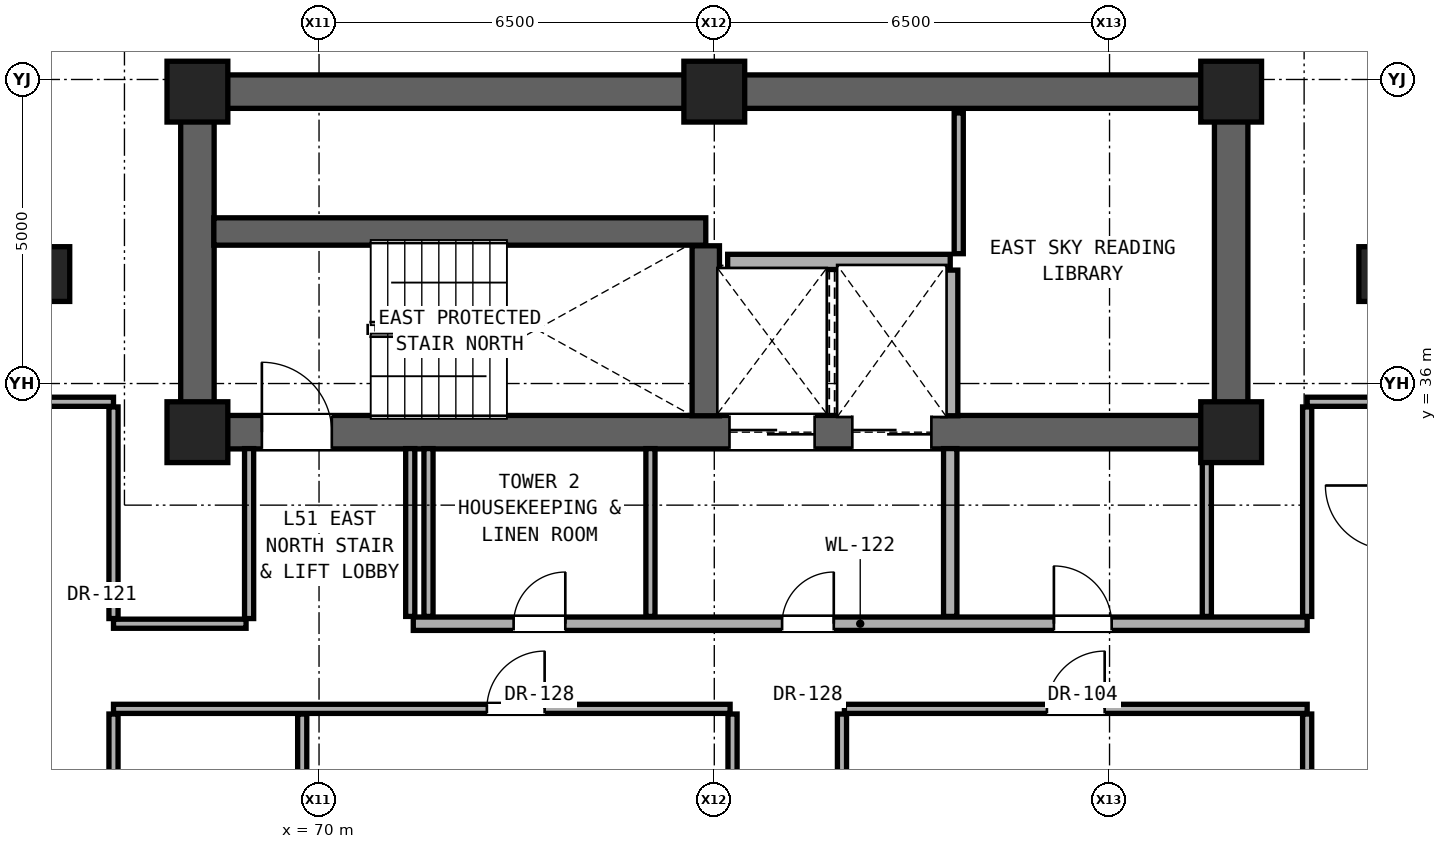
"""IFC4 building model, lengths in metres.
Left out: names, types, materials, properties, quantities, classifications, styles, units other than length and angle.
Written with IfcOpenShell. Run it as: python <this file> out.ifc"""

import sys

from ifc_helpers import new_model, si_unit, direction, frame, frame_2d, origin, origin_2d, place, context, subcontext, project, spatial, rectangle, extrude, element, fill, save


model = new_model("IFC4")
c1 = context("Model", 3, precision=1e-05, world=origin(), true_north=direction((0.0, 1.0)))
c2 = subcontext(c1, "Body", "Model", "MODEL_VIEW")
j1 = project(units=[si_unit("LENGTHUNIT", "METRE"), si_unit("PLANEANGLEUNIT", "RADIAN")], contexts=[c1])
p1 = place(None, origin())
s1 = spatial("IfcSite", under=j1, at=p1, CompositionType="ELEMENT")
p2 = place(p1, origin())
s2 = spatial("IfcBuilding", under=s1, at=p2, CompositionType="ELEMENT")
p3 = place(p2, frame((0.0, 0.0, 180.4)))
s3 = spatial("IfcBuildingStorey", under=s2, at=p3, CompositionType="ELEMENT", Elevation=180.4)
for number, where, z_axis, x_axis in (
    (1, (68.0, 35.2, 0.0), (0.0, 0.0, 1.0), (1.0, 0.0, 0.0)),
    (2, (85.0, 35.2, 0.0), (0.0, 0.0, 1.0), (1.0, 0.0, 0.0)),
    (3, (68.0, 40.8, 0.0), (0.0, 0.0, 1.0), (1.0, 0.0, 0.0)),
    (4, (76.5, 40.8, 0.0), (0.0, 0.0, 1.0), (1.0, 0.0, 0.0)),
    (5, (85.0, 40.8, 0.0), (0.0, 0.0, 1.0), (1.0, 0.0, 0.0)),
):
    element("IfcColumn", number, at=place(p3, frame(where, z_axis=z_axis, x_axis=x_axis)), inside=s3, PredefinedType="COLUMN", context=c2, shape_type="SweptSolid", body=[
        extrude(rectangle(XDim=1.0, YDim=1.0, at=origin_2d()), origin(), (0.0, 0.0, 1.0), 3.25),
    ])
for number, where, z_axis, x_axis in (
    (6, (65.6, 37.8, 0.0), (0.0, 0.0, 1.0), (1.0, 0.0, 0.0)),
    (7, (87.4, 37.8, 0.0), (0.0, 0.0, 1.0), (1.0, 0.0, 0.0)),
):
    element("IfcColumn", number, at=place(p3, frame(where, z_axis=z_axis, x_axis=x_axis)), inside=s3, PredefinedType="PILASTER", context=c2, shape_type="SweptSolid", body=[
        extrude(rectangle(XDim=0.6, YDim=0.9, at=origin_2d()), origin(), (0.0, 0.0, 1.0), 3.25),
    ])
p4 = place(p3, frame((68.0, 40.8, 0.0), z_axis=(0.0, 0.0, 1.0), x_axis=(1.0, 0.0, 0.0)))
e8 = element("IfcWall", 8, at=p4, inside=s3, PredefinedType="SHEAR", context=c2, shape_type="SweptSolid", body=[
    extrude(rectangle(XDim=17.0, YDim=0.55, at=frame_2d((8.5, 0.0))), origin(), (0.0, 0.0, 1.0), 3.05),
])
for number, where, z_axis, x_axis in (
    (9, (68.0, 35.2, 0.0), (0.0, 0.0, 1.0), (0.0, 1.0, 0.0)),
    (10, (85.0, 35.2, 0.0), (0.0, 0.0, 1.0), (0.0, 1.0, 0.0)),
):
    element("IfcWall", number, at=place(p3, frame(where, z_axis=z_axis, x_axis=x_axis)), inside=s3, PredefinedType="SHEAR", context=c2, shape_type="SweptSolid", body=[
        extrude(rectangle(XDim=5.6, YDim=0.55, at=frame_2d((2.8, 0.0))), origin(), (0.0, 0.0, 1.0), 3.05),
    ])
p5 = place(p3, frame((68.0, 35.2, 0.0), z_axis=(0.0, 0.0, 1.0), x_axis=(1.0, 0.0, 0.0)))
e11 = element("IfcWall", 11, at=p5, inside=s3, PredefinedType="SHEAR", context=c2, shape_type="SweptSolid", body=[
    extrude(rectangle(XDim=17.0, YDim=0.55, at=frame_2d((8.5, 0.0))), origin(), (0.0, 0.0, 1.0), 3.05),
])
p6 = place(p5, frame((1.06, 0.0, 0.0)))
e12 = element("IfcOpeningElement", 12, at=p6, cuts=e11, PredefinedType="OPENING", context=c2, shape_type="SweptSolid", body=[
    extrude(rectangle(XDim=1.15, YDim=2.2, at=frame_2d((0.575, 1.1))), frame((0.0, 0.285, 0.0), z_axis=(0.0, -1.0, 0.0), x_axis=(1.0, 0.0, 0.0)), (0.0, 0.0, 1.0), 0.57),
])
p7 = place(p5, frame((8.75, 0.0, 0.0)))
e13 = element("IfcOpeningElement", 13, at=p7, cuts=e11, PredefinedType="OPENING", context=c2, shape_type="SweptSolid", body=[
    extrude(rectangle(XDim=1.4, YDim=2.35, at=frame_2d((0.7, 1.175))), frame((0.0, 0.285, 0.0), z_axis=(0.0, -1.0, 0.0), x_axis=(1.0, 0.0, 0.0)), (0.0, 0.0, 1.0), 0.57),
])
p8 = place(p5, frame((10.77, 0.0, 0.0)))
e14 = element("IfcOpeningElement", 14, at=p8, cuts=e11, PredefinedType="OPENING", context=c2, shape_type="SweptSolid", body=[
    extrude(rectangle(XDim=1.3, YDim=2.3, at=frame_2d((0.65, 1.15))), frame((0.0, 0.285, 0.0), z_axis=(0.0, -1.0, 0.0), x_axis=(1.0, 0.0, 0.0)), (0.0, 0.0, 1.0), 0.57),
])
p9 = place(p3, frame((66.62, 30.65, 0.0), z_axis=(0.0, 0.0, 1.0), x_axis=(1.0, 0.0, 0.0)))
e15 = element("IfcWall", 15, at=p9, inside=s3, PredefinedType="PARTITIONING", context=c2, shape_type="SweptSolid", body=[
    extrude(rectangle(XDim=10.14, YDim=0.15, at=frame_2d((5.07, 0.0))), origin(), (0.0, 0.0, 1.0), 2.186),
])
p10 = place(p9, frame((6.14, 0.0, 0.0)))
e16 = element("IfcOpeningElement", 16, at=p10, cuts=e15, PredefinedType="OPENING", context=c2, shape_type="SweptSolid", body=[
    extrude(rectangle(XDim=0.95, YDim=2.15, at=frame_2d((0.475, 1.075))), frame((0.0, 0.085, 0.0), z_axis=(0.0, -1.0, 0.0), x_axis=(1.0, 0.0, 0.0)), (0.0, 0.0, 1.0), 0.17),
])
p11 = place(p3, frame((78.64, 30.65, 0.0), z_axis=(0.0, 0.0, 1.0), x_axis=(1.0, 0.0, 0.0)))
e17 = element("IfcWall", 17, at=p11, inside=s3, PredefinedType="PARTITIONING", context=c2, shape_type="SweptSolid", body=[
    extrude(rectangle(XDim=7.61, YDim=0.15, at=frame_2d((3.805, 0.0))), origin(), (0.0, 0.0, 1.0), 2.186),
])
p12 = place(p11, frame((3.33, 0.0, 0.0)))
e18 = element("IfcOpeningElement", 18, at=p12, cuts=e17, PredefinedType="OPENING", context=c2, shape_type="SweptSolid", body=[
    extrude(rectangle(XDim=0.95, YDim=2.15, at=frame_2d((0.475, 1.075))), frame((0.0, 0.085, 0.0), z_axis=(0.0, -1.0, 0.0), x_axis=(1.0, 0.0, 0.0)), (0.0, 0.0, 1.0), 0.17),
])
p13 = place(p3, frame((66.62, 32.05, 0.0), z_axis=(0.0, 0.0, 1.0), x_axis=(1.0, 0.0, 0.0)))
e19 = element("IfcWall", 19, at=p13, inside=s3, PredefinedType="PARTITIONING", context=c2, shape_type="SweptSolid", body=[
    extrude(rectangle(XDim=2.18, YDim=0.15, at=frame_2d((1.09, 0.0))), origin(), (0.0, 0.0, 1.0), 2.186),
])
p14 = place(p3, frame((71.55, 32.05, 0.0), z_axis=(0.0, 0.0, 1.0), x_axis=(1.0, 0.0, 0.0)))
e20 = element("IfcWall", 20, at=p14, inside=s3, PredefinedType="SOLIDWALL", context=c2, shape_type="SweptSolid", body=[
    extrude(rectangle(XDim=14.7, YDim=0.22, at=frame_2d((7.35, 0.0))), origin(), (0.0, 0.0, 1.0), 2.186),
])
p15 = place(p14, frame((6.065, 0.0, 0.0)))
e21 = element("IfcOpeningElement", 21, at=p15, cuts=e20, PredefinedType="OPENING", context=c2, shape_type="SweptSolid", body=[
    extrude(rectangle(XDim=0.85, YDim=2.01, at=frame_2d((0.425, 1.005))), frame((0.0, 0.12, 0.0), z_axis=(0.0, -1.0, 0.0), x_axis=(1.0, 0.0, 0.0)), (0.0, 0.0, 1.0), 0.24),
])
p16 = place(p14, frame((10.535, 0.0, 0.0)))
e22 = element("IfcOpeningElement", 22, at=p16, cuts=e20, PredefinedType="OPENING", context=c2, shape_type="SweptSolid", body=[
    extrude(rectangle(XDim=0.95, YDim=2.15, at=frame_2d((0.475, 1.075))), frame((0.0, 0.12, 0.0), z_axis=(0.0, -1.0, 0.0), x_axis=(1.0, 0.0, 0.0)), (0.0, 0.0, 1.0), 0.24),
])
p17 = place(p14, frame((1.65, 0.0, 0.0)))
e23 = element("IfcOpeningElement", 23, at=p17, cuts=e20, PredefinedType="OPENING", context=c2, shape_type="SweptSolid", body=[
    extrude(rectangle(XDim=0.85, YDim=2.01, at=frame_2d((0.425, 1.005))), frame((0.0, 0.12, 0.0), z_axis=(0.0, -1.0, 0.0), x_axis=(1.0, 0.0, 0.0)), (0.0, 0.0, 1.0), 0.24),
])
p18 = place(p3, frame((65.25, 35.7, 0.0), z_axis=(0.0, 0.0, 1.0), x_axis=(1.0, 0.0, 0.0)))
e24 = element("IfcWall", 24, at=p18, inside=s3, PredefinedType="PARTITIONING", context=c2, shape_type="SweptSolid", body=[
    extrude(rectangle(XDim=1.37, YDim=0.15, at=frame_2d((0.685, 0.0))), origin(), (0.0, 0.0, 1.0), 3.05),
])
p19 = place(p3, frame((86.25, 35.7, 0.0), z_axis=(0.0, 0.0, 1.0), x_axis=(1.0, 0.0, 0.0)))
e25 = element("IfcWall", 25, at=p19, inside=s3, PredefinedType="PARTITIONING", context=c2, shape_type="SweptSolid", body=[
    extrude(rectangle(XDim=1.35, YDim=0.15, at=frame_2d((0.675, 0.0))), origin(), (0.0, 0.0, 1.0), 3.05),
])
p20 = place(p3, frame((76.72, 38.0, 0.0), z_axis=(0.0, 0.0, 1.0), x_axis=(1.0, 0.0, 0.0)))
e26 = element("IfcWall", 26, at=p20, inside=s3, PredefinedType="SOLIDWALL", context=c2, shape_type="SweptSolid", body=[
    extrude(rectangle(XDim=3.66, YDim=0.25, at=frame_2d((1.83, 0.0))), origin(), (0.0, 0.0, 1.0), 3.05),
])
p21 = place(p3, frame((68.27, 38.5, 0.0), z_axis=(0.0, 0.0, 1.0), x_axis=(1.0, 0.0, 0.0)))
e27 = element("IfcWall", 27, at=p21, inside=s3, PredefinedType="SHEAR", context=c2, shape_type="SweptSolid", body=[
    extrude(rectangle(XDim=8.09, YDim=0.45, at=frame_2d((4.045, 0.0))), origin(), (0.0, 0.0, 1.0), 3.05),
])
p22 = place(p3, frame((66.62, 24.935, 0.0), z_axis=(0.0, 0.0, 1.0), x_axis=(0.0, 1.0, 0.0)))
e28 = element("IfcWall", 28, at=p22, inside=s3, PredefinedType="PARTITIONING", context=c2, shape_type="SweptSolid", body=[
    extrude(rectangle(XDim=5.63, YDim=0.15, at=frame_2d((2.815, 0.0))), origin(), (0.0, 0.0, 1.0), 2.346),
])
p23 = place(p22, frame((2.34, 0.0, 0.0)))
e29 = element("IfcOpeningElement", 29, at=p23, cuts=e28, PredefinedType="OPENING", context=c2, shape_type="SweptSolid", body=[
    extrude(rectangle(XDim=0.95, YDim=2.15, at=frame_2d((0.475, 1.075))), frame((0.0, 0.085, 0.0), z_axis=(0.0, -1.0, 0.0), x_axis=(1.0, 0.0, 0.0)), (0.0, 0.0, 1.0), 0.17),
])
p24 = place(p3, frame((66.62, 32.135, 0.0), z_axis=(0.0, 0.0, 1.0), x_axis=(0.0, 1.0, 0.0)))
e30 = element("IfcWall", 30, at=p24, inside=s3, PredefinedType="PARTITIONING", context=c2, shape_type="SweptSolid", body=[
    extrude(rectangle(XDim=3.48, YDim=0.15, at=frame_2d((1.74, 0.0))), origin(), (0.0, 0.0, 1.0), 2.442),
])
p25 = place(p3, frame((68.85, 32.135, 0.0), z_axis=(0.0, 0.0, 1.0), x_axis=(0.0, 1.0, 0.0)))
e31 = element("IfcWall", 31, at=p25, inside=s3, PredefinedType="PARTITIONING", context=c2, shape_type="SweptSolid", body=[
    extrude(rectangle(XDim=2.795, YDim=0.15, at=frame_2d((1.397, 0.0))), origin(), (0.0, 0.0, 1.0), 3.05),
])
p26 = place(p3, frame((69.723, 24.935, 0.0), z_axis=(0.0, 0.0, 1.0), x_axis=(0.0, 1.0, 0.0)))
e32 = element("IfcWall", 32, at=p26, inside=s3, PredefinedType="PARTITIONING", context=c2, shape_type="SweptSolid", body=[
    extrude(rectangle(XDim=5.63, YDim=0.15, at=frame_2d((2.815, 0.0))), origin(), (0.0, 0.0, 1.0), 2.186),
])
for number, where, z_axis, x_axis in (
    (33, (71.5, 32.17, 0.0), (0.0, 0.0, 1.0), (0.0, 1.0, 0.0)),
    (34, (71.8, 32.17, 0.0), (0.0, 0.0, 1.0), (0.0, 1.0, 0.0)),
    (35, (75.45, 32.17, 0.0), (0.0, 0.0, 1.0), (0.0, 1.0, 0.0)),
):
    element("IfcWall", number, at=place(p3, frame(where, z_axis=z_axis, x_axis=x_axis)), inside=s3, PredefinedType="PARTITIONING", context=c2, shape_type="SweptSolid", body=[
        extrude(rectangle(XDim=2.76, YDim=0.15, at=frame_2d((1.38, 0.0))), origin(), (0.0, 0.0, 1.0), 3.05),
    ])
p27 = place(p3, frame((76.36, 35.47, 0.0), z_axis=(0.0, 0.0, 1.0), x_axis=(0.0, 1.0, 0.0)))
e36 = element("IfcWall", 36, at=p27, inside=s3, PredefinedType="SHEAR", context=c2, shape_type="SweptSolid", body=[
    extrude(rectangle(XDim=2.795, YDim=0.45, at=frame_2d((1.397, 0.0))), origin(), (0.0, 0.0, 1.0), 3.05),
])
p28 = place(p3, frame((76.8, 22.435, 0.0), z_axis=(0.0, 0.0, 1.0), x_axis=(0.0, 1.0, 0.0)))
e37 = element("IfcWall", 37, at=p28, inside=s3, PredefinedType="PARTITIONING", context=c2, shape_type="SweptSolid", body=[
    extrude(rectangle(XDim=8.13, YDim=0.15, at=frame_2d((4.065, 0.0))), origin(), (0.0, 0.0, 1.0), 2.186),
])
p29 = place(p3, frame((78.6, 27.485, 0.0), z_axis=(0.0, 0.0, 1.0), x_axis=(0.0, 1.0, 0.0)))
e38 = element("IfcWall", 38, at=p29, inside=s3, PredefinedType="PARTITIONING", context=c2, shape_type="SweptSolid", body=[
    extrude(rectangle(XDim=3.08, YDim=0.15, at=frame_2d((1.54, 0.0))), origin(), (0.0, 0.0, 1.0), 2.186),
])
p30 = place(p3, frame((80.38, 32.17, 0.0), z_axis=(0.0, 0.0, 1.0), x_axis=(0.0, 1.0, 0.0)))
e39 = element("IfcWall", 39, at=p30, inside=s3, PredefinedType="SOLIDWALL", context=c2, shape_type="SweptSolid", body=[
    extrude(rectangle(XDim=2.76, YDim=0.22, at=frame_2d((1.38, 0.0))), origin(), (0.0, 0.0, 1.0), 3.05),
])
p31 = place(p3, frame((80.38, 35.47, 0.0), z_axis=(0.0, 0.0, 1.0), x_axis=(0.0, 1.0, 0.0)))
e40 = element("IfcWall", 40, at=p31, inside=s3, PredefinedType="SOLIDWALL", context=c2, shape_type="SweptSolid", body=[
    extrude(rectangle(XDim=2.395, YDim=0.25, at=frame_2d((1.198, 0.0))), origin(), (0.0, 0.0, 1.0), 3.05),
])
p32 = place(p3, frame((80.52, 38.135, 0.0), z_axis=(0.0, 0.0, 1.0), x_axis=(0.0, 1.0, 0.0)))
e41 = element("IfcWall", 41, at=p32, inside=s3, PredefinedType="PARTITIONING", context=c2, shape_type="SweptSolid", body=[
    extrude(rectangle(XDim=2.315, YDim=0.15, at=frame_2d((1.157, 0.0))), origin(), (0.0, 0.0, 1.0), 3.05),
])
p33 = place(p3, frame((84.6, 32.17, 0.0), z_axis=(0.0, 0.0, 1.0), x_axis=(0.0, 1.0, 0.0)))
e42 = element("IfcWall", 42, at=p33, inside=s3, PredefinedType="PARTITIONING", context=c2, shape_type="SweptSolid", body=[
    extrude(rectangle(XDim=2.76, YDim=0.15, at=frame_2d((1.38, 0.0))), origin(), (0.0, 0.0, 1.0), 3.05),
])
p34 = place(p3, frame((86.25, 27.485, 0.0), z_axis=(0.0, 0.0, 1.0), x_axis=(0.0, 1.0, 0.0)))
e43 = element("IfcWall", 43, at=p34, inside=s3, PredefinedType="PARTITIONING", context=c2, shape_type="SweptSolid", body=[
    extrude(rectangle(XDim=3.08, YDim=0.15, at=frame_2d((1.54, 0.0))), origin(), (0.0, 0.0, 1.0), 2.346),
])
p35 = place(p3, frame((86.25, 32.17, 0.0), z_axis=(0.0, 0.0, 1.0), x_axis=(0.0, 1.0, 0.0)))
e44 = element("IfcWall", 44, at=p35, inside=s3, PredefinedType="PARTITIONING", context=c2, shape_type="SweptSolid", body=[
    extrude(rectangle(XDim=3.445, YDim=0.15, at=frame_2d((1.723, 0.0))), origin(), (0.0, 0.0, 1.0), 2.442),
])
p36 = place(p6, origin())
e45 = element("IfcDoor", 45, at=p36, inside=s3, OperationType="SINGLE_SWING_LEFT", PredefinedType="DOOR", context=c2, shape_type="SweptSolid", body=[
    extrude(rectangle(XDim=1.15, YDim=2.2, at=frame_2d((0.575, 1.1))), frame((0.0, 0.025, 0.0), z_axis=(0.0, -1.0, 0.0), x_axis=(1.0, 0.0, 0.0)), (0.0, 0.0, 1.0), 0.05),
])
fill(e12, e45)
p37 = place(p15, origin())
e46 = element("IfcDoor", 46, at=p37, inside=s3, OperationType="SINGLE_SWING_RIGHT", PredefinedType="DOOR", context=c2, shape_type="SweptSolid", body=[
    extrude(rectangle(XDim=0.85, YDim=2.01, at=frame_2d((0.425, 1.005))), frame((0.0, 0.025, 0.0), z_axis=(0.0, -1.0, 0.0), x_axis=(1.0, 0.0, 0.0)), (0.0, 0.0, 1.0), 0.05),
])
fill(e21, e46)
p38 = place(p16, origin())
e47 = element("IfcDoor", 47, at=p38, inside=s3, OperationType="SINGLE_SWING_LEFT", PredefinedType="DOOR", context=c2, shape_type="SweptSolid", body=[
    extrude(rectangle(XDim=0.95, YDim=2.15, at=frame_2d((0.475, 1.075))), frame((0.0, 0.025, 0.0), z_axis=(0.0, -1.0, 0.0), x_axis=(1.0, 0.0, 0.0)), (0.0, 0.0, 1.0), 0.05),
])
fill(e22, e47)
p39 = place(p17, origin())
e48 = element("IfcDoor", 48, at=p39, inside=s3, OperationType="SINGLE_SWING_RIGHT", PredefinedType="DOOR", context=c2, shape_type="SweptSolid", body=[
    extrude(rectangle(XDim=0.85, YDim=2.01, at=frame_2d((0.425, 1.005))), frame((0.0, 0.025, 0.0), z_axis=(0.0, -1.0, 0.0), x_axis=(1.0, 0.0, 0.0)), (0.0, 0.0, 1.0), 0.05),
])
fill(e23, e48)
p40 = place(p10, origin())
e49 = element("IfcDoor", 49, at=p40, inside=s3, OperationType="SINGLE_SWING_RIGHT", PredefinedType="DOOR", context=c2, shape_type="SweptSolid", body=[
    extrude(rectangle(XDim=0.95, YDim=2.15, at=frame_2d((0.475, 1.075))), frame((0.0, 0.025, 0.0), z_axis=(0.0, -1.0, 0.0), x_axis=(1.0, 0.0, 0.0)), (0.0, 0.0, 1.0), 0.05),
])
fill(e16, e49)
p41 = place(p12, origin())
e50 = element("IfcDoor", 50, at=p41, inside=s3, OperationType="SINGLE_SWING_RIGHT", PredefinedType="DOOR", context=c2, shape_type="SweptSolid", body=[
    extrude(rectangle(XDim=0.95, YDim=2.15, at=frame_2d((0.475, 1.075))), frame((0.0, 0.025, 0.0), z_axis=(0.0, -1.0, 0.0), x_axis=(1.0, 0.0, 0.0)), (0.0, 0.0, 1.0), 0.05),
])
fill(e18, e50)
p42 = place(p7, origin())
e51 = element("IfcDoor", 51, at=p42, inside=s3, OperationType="DOUBLE_DOOR_SLIDING", PredefinedType="DOOR", context=c2, shape_type="SweptSolid", body=[
    extrude(rectangle(XDim=1.4, YDim=2.35, at=frame_2d((0.7, 1.175))), frame((0.0, 0.025, 0.0), z_axis=(0.0, -1.0, 0.0), x_axis=(1.0, 0.0, 0.0)), (0.0, 0.0, 1.0), 0.05),
])
fill(e13, e51)
p43 = place(p8, origin())
e52 = element("IfcDoor", 52, at=p43, inside=s3, OperationType="DOUBLE_DOOR_SLIDING", PredefinedType="DOOR", context=c2, shape_type="SweptSolid", body=[
    extrude(rectangle(XDim=1.3, YDim=2.3, at=frame_2d((0.65, 1.15))), frame((0.0, 0.025, 0.0), z_axis=(0.0, -1.0, 0.0), x_axis=(1.0, 0.0, 0.0)), (0.0, 0.0, 1.0), 0.05),
])
fill(e14, e52)
save(model, sys.argv[1])
